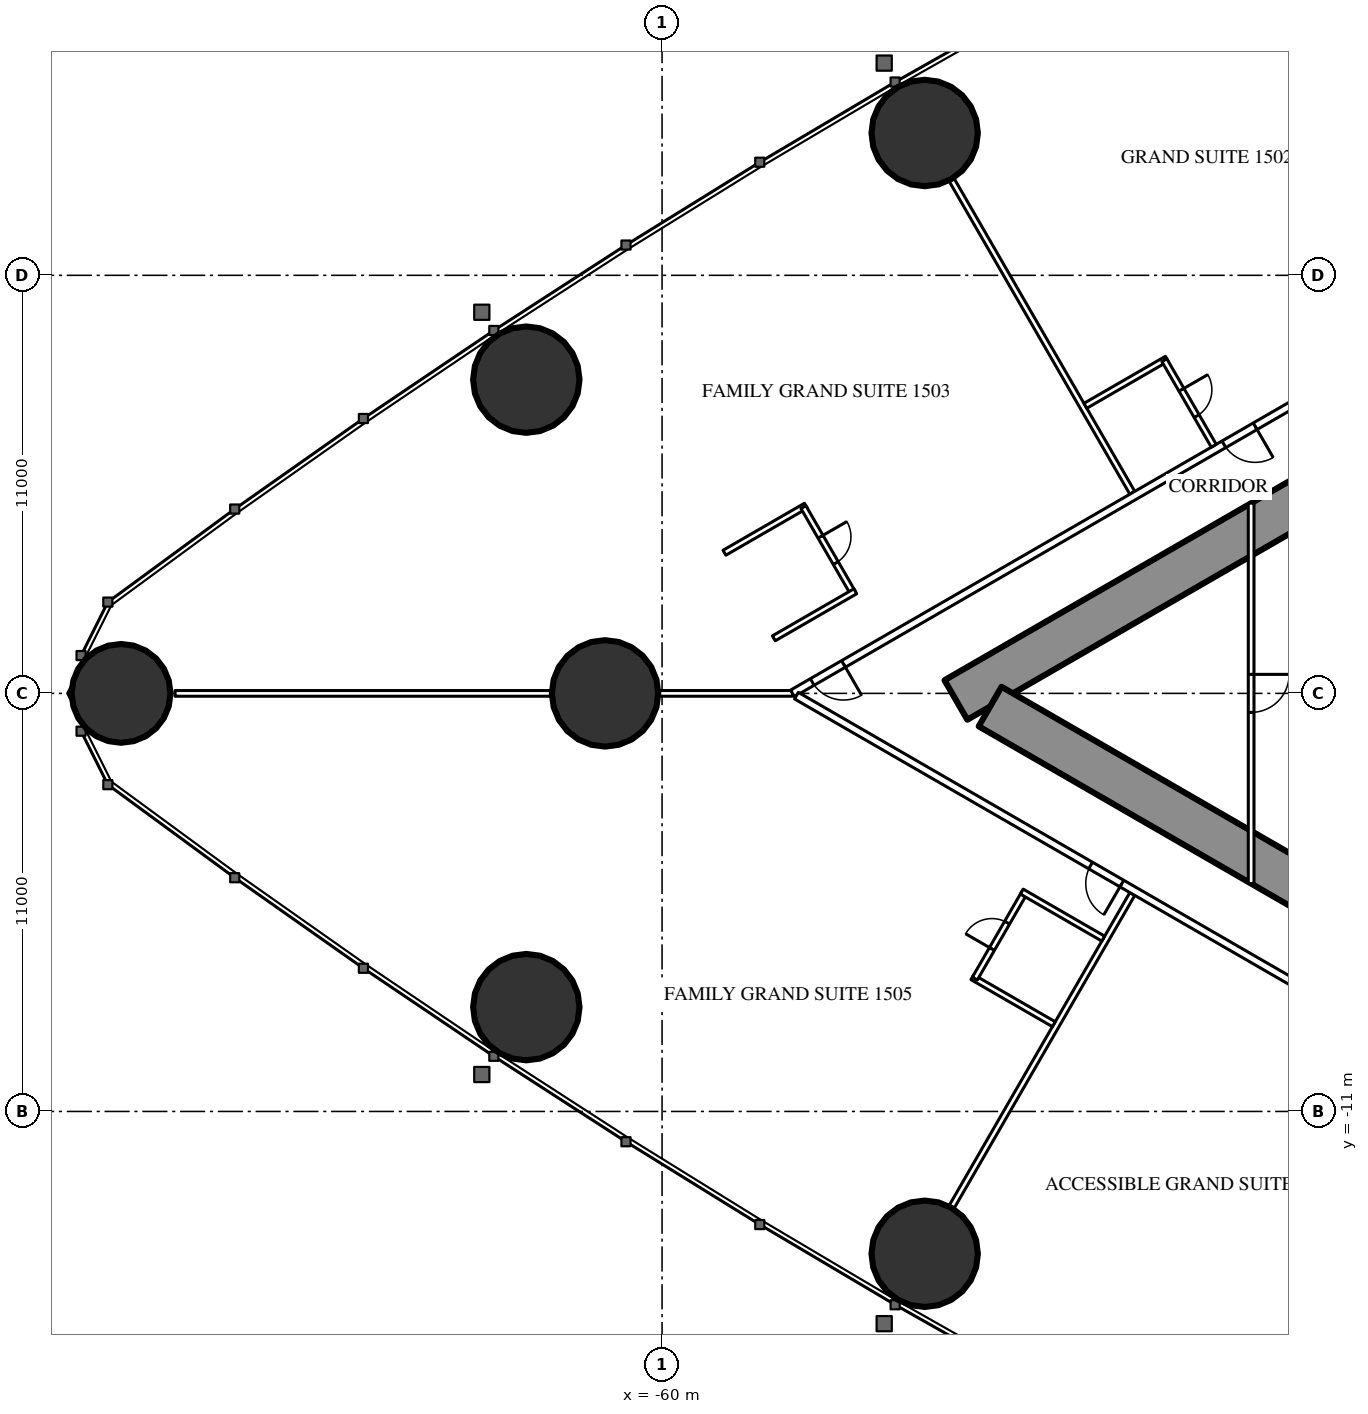
"""IFC4 building model, lengths in metres.
Left out: names, types, materials, properties, quantities, classifications, styles, units other than length and angle.
Written with IfcOpenShell. Run it as: python <this file> out.ifc"""

import sys

from ifc_helpers import new_model, si_unit, direction, frame, frame_2d, origin, origin_2d, place, context, subcontext, project, spatial, rectangle, hollow_circle, extrude, element, fill, save


model = new_model("IFC4")
c1 = context("Model", 3, precision=1e-05, world=origin(), true_north=direction((0.0, 1.0)))
c2 = subcontext(c1, "Body", "Model", "MODEL_VIEW")
j1 = project(units=[si_unit("LENGTHUNIT", "METRE"), si_unit("PLANEANGLEUNIT", "RADIAN")], contexts=[c1])
p1 = place(None, origin())
s1 = spatial("IfcSite", under=j1, at=p1, CompositionType="ELEMENT")
p2 = place(p1, origin())
s2 = spatial("IfcBuilding", under=s1, at=p2, CompositionType="ELEMENT")
p3 = place(p2, frame((0.0, 0.0, 60.0)))
s3 = spatial("IfcBuildingStorey", under=s2, at=p3, CompositionType="ELEMENT", Elevation=60.0)
p4 = place(p3, frame((-74.235, 0.0, 0.0), z_axis=(0.0, 0.0, 1.0), x_axis=(1.0, 0.0, 0.0)))
e1 = element("IfcColumn", 1, at=p4, inside=s3, PredefinedType="COLUMN", context=c2, shape_type="SweptSolid", body=[
    extrude(hollow_circle(Radius=1.3, WallThickness=0.1, at=origin_2d()), origin(), (0.0, 0.0, 1.0), 3.5),
])
for number, where, z_axis, x_axis in (
    (2, (-63.572, -8.255, 0.0), (0.0, 0.0, 1.0), (1.0, 0.0, 0.0)),
    (3, (-53.09, -14.745, 0.0), (0.0, 0.0, 1.0), (1.0, 0.0, 0.0)),
    (4, (-53.09, 14.745, 0.0), (0.0, 0.0, 1.0), (1.0, 0.0, 0.0)),
    (5, (-63.572, 8.255, 0.0), (0.0, 0.0, 1.0), (1.0, 0.0, 0.0)),
):
    element("IfcColumn", number, at=place(p3, frame(where, z_axis=z_axis, x_axis=x_axis)), inside=s3, PredefinedType="COLUMN", context=c2, shape_type="SweptSolid", body=[
        extrude(hollow_circle(Radius=1.4, WallThickness=0.12, at=origin_2d()), origin(), (0.0, 0.0, 1.0), 3.5),
    ])
p5 = place(p3, frame((-61.5, 0.0, 0.0), z_axis=(0.0, 0.0, 1.0), x_axis=(1.0, 0.0, 0.0)))
e6 = element("IfcColumn", 6, at=p5, inside=s3, PredefinedType="COLUMN", context=c2, shape_type="SweptSolid", body=[
    extrude(hollow_circle(Radius=1.4, WallThickness=0.1, at=origin_2d()), origin(), (0.0, 0.0, 1.0), 3.5),
])
p6 = place(p3, frame((-27.2, 14.3, 0.0), z_axis=(0.0, 0.0, 1.0), x_axis=(-0.866026593062, -0.499997940104, 0.0)))
e7 = element("IfcWall", 7, at=p6, inside=s3, PredefinedType="SHEAR", context=c2, shape_type="SweptSolid", body=[
    extrude(rectangle(XDim=28.946, YDim=1.2, at=frame_2d((14.473, 0.0))), origin(), (0.0, 0.0, 1.0), 3.5),
])
p7 = place(p6, frame((4.6, 0.0, 0.0)))
e8 = element("IfcOpeningElement", 8, at=p7, cuts=e7, PredefinedType="OPENING", context=c2, shape_type="SweptSolid", body=[
    extrude(rectangle(XDim=1.0, YDim=2.2, at=frame_2d((0.5, 1.1))), frame((0.0, 0.61, 0.0), z_axis=(0.0, -1.0, 0.0), x_axis=(1.0, 0.0, 0.0)), (0.0, 0.0, 1.0), 1.22),
])
p8 = place(p6, frame((13.395, 0.0, 0.0)))
e9 = element("IfcOpeningElement", 9, at=p8, cuts=e7, PredefinedType="OPENING", context=c2, shape_type="SweptSolid", body=[
    extrude(rectangle(XDim=1.8, YDim=2.2, at=frame_2d((0.9, 1.1))), frame((0.0, 0.61, 0.0), z_axis=(0.0, -1.0, 0.0), x_axis=(1.0, 0.0, 0.0)), (0.0, 0.0, 1.0), 1.22),
])
p9 = place(p3, frame((-27.2, -14.3, 0.0), z_axis=(0.0, 0.0, 1.0), x_axis=(-0.866024021859, 0.500002393557, 0.0)))
e10 = element("IfcWall", 10, at=p9, inside=s3, PredefinedType="SHEAR", context=c2, shape_type="SweptSolid", body=[
    extrude(rectangle(XDim=27.907, YDim=1.2, at=frame_2d((13.954, 0.0))), origin(), (0.0, 0.0, 1.0), 3.5),
])
p10 = place(p9, frame((4.6, 0.0, 0.0)))
e11 = element("IfcOpeningElement", 11, at=p10, cuts=e10, PredefinedType="OPENING", context=c2, shape_type="SweptSolid", body=[
    extrude(rectangle(XDim=1.0, YDim=2.2, at=frame_2d((0.5, 1.1))), frame((0.0, 0.61, 0.0), z_axis=(0.0, -1.0, 0.0), x_axis=(1.0, 0.0, 0.0)), (0.0, 0.0, 1.0), 1.22),
])
p11 = place(p9, frame((13.395, 0.0, 0.0)))
e12 = element("IfcOpeningElement", 12, at=p11, cuts=e10, PredefinedType="OPENING", context=c2, shape_type="SweptSolid", body=[
    extrude(rectangle(XDim=1.8, YDim=2.2, at=frame_2d((0.9, 1.1))), frame((0.0, 0.61, 0.0), z_axis=(0.0, -1.0, 0.0), x_axis=(1.0, 0.0, 0.0)), (0.0, 0.0, 1.0), 1.22),
])
for number, where, z_axis, x_axis in (
    (13, (-47.627, 5.278, 0.0), (0.0, 0.0, 1.0), (-0.5, 0.866, 0.0)),
    (14, (-47.627, -5.278, 0.0), (0.0, 0.0, 1.0), (-0.5, -0.866, 0.0)),
):
    element("IfcWall", number, at=place(p3, frame(where, z_axis=z_axis, x_axis=x_axis)), inside=s3, PredefinedType="PARTITIONING", context=c2, shape_type="SweptSolid", body=[
        extrude(rectangle(XDim=9.51, YDim=0.15, at=frame_2d((4.755, 0.0))), origin(), (0.0, 0.0, 1.0), 2.25),
    ])
p12 = place(p3, frame((-56.568, 0.0, 0.0), z_axis=(0.0, 0.0, 1.0), x_axis=(-1.0, 0.0, 0.0)))
e15 = element("IfcWall", 15, at=p12, inside=s3, PredefinedType="PARTITIONING", context=c2, shape_type="SweptSolid", body=[
    extrude(rectangle(XDim=16.247, YDim=0.15, at=frame_2d((8.124, 0.0))), origin(), (0.0, 0.0, 1.0), 2.25),
])
p13 = place(p3, frame((-37.7, 10.894, 0.0), z_axis=(0.0, 0.0, 1.0), x_axis=(-0.866027905338, -0.499995667157, 0.0)))
e16 = element("IfcWall", 16, at=p13, inside=s3, PredefinedType="PARTITIONING", context=c2, shape_type="SweptSolid", body=[
    extrude(rectangle(XDim=21.787, YDim=0.2, at=frame_2d((10.894, 0.0))), origin(), (0.0, 0.0, 1.0), 3.25),
])
p14 = place(p13, frame((20.237, 0.0, 0.0)))
e17 = element("IfcOpeningElement", 17, at=p14, cuts=e16, PredefinedType="OPENING", context=c2, shape_type="SweptSolid", body=[
    extrude(rectangle(XDim=0.95, YDim=2.2, at=frame_2d((0.475, 1.1))), frame((0.0, 0.11, 0.0), z_axis=(0.0, -1.0, 0.0), x_axis=(1.0, 0.0, 0.0)), (0.0, 0.0, 1.0), 0.22),
])
p15 = place(p13, frame((7.73, 0.0, 0.0)))
e18 = element("IfcOpeningElement", 18, at=p15, cuts=e16, PredefinedType="OPENING", context=c2, shape_type="SweptSolid", body=[
    extrude(rectangle(XDim=0.95, YDim=2.2, at=frame_2d((0.475, 1.1))), frame((0.0, 0.11, 0.0), z_axis=(0.0, -1.0, 0.0), x_axis=(1.0, 0.0, 0.0)), (0.0, 0.0, 1.0), 0.22),
])
p16 = place(p3, frame((-36.92, -11.344, 0.0), z_axis=(0.0, 0.0, 1.0), x_axis=(-0.866028313256, 0.499994960614, 0.0)))
e19 = element("IfcWall", 19, at=p16, inside=s3, PredefinedType="PARTITIONING", context=c2, shape_type="SweptSolid", body=[
    extrude(rectangle(XDim=22.568, YDim=0.2, at=frame_2d((11.284, 0.0))), origin(), (0.0, 0.0, 1.0), 3.25),
])
p17 = place(p16, frame((12.68, 0.0, 0.0)))
e20 = element("IfcOpeningElement", 20, at=p17, cuts=e19, PredefinedType="OPENING", context=c2, shape_type="SweptSolid", body=[
    extrude(rectangle(XDim=0.95, YDim=2.2, at=frame_2d((0.475, 1.1))), frame((0.0, 0.11, 0.0), z_axis=(0.0, -1.0, 0.0), x_axis=(1.0, 0.0, 0.0)), (0.0, 0.0, 1.0), 0.22),
])
p18 = place(p16, frame((3.35, 0.0, 0.0)))
e21 = element("IfcOpeningElement", 21, at=p18, cuts=e19, PredefinedType="OPENING", context=c2, shape_type="SweptSolid", body=[
    extrude(rectangle(XDim=1.0, YDim=2.2, at=frame_2d((0.5, 1.1))), frame((0.0, 0.11, 0.0), z_axis=(0.0, -1.0, 0.0), x_axis=(1.0, 0.0, 0.0)), (0.0, 0.0, 1.0), 0.22),
])
p19 = place(p3, frame((-56.215, 4.938, 0.0), z_axis=(0.0, 0.0, 1.0), x_axis=(-0.866006523861, -0.500032699561, 0.0)))
e22 = element("IfcWall", 22, at=p19, inside=s3, PredefinedType="PARTITIONING", context=c2, shape_type="SweptSolid", body=[
    extrude(rectangle(XDim=2.475, YDim=0.15, at=frame_2d((1.237, 0.0))), origin(), (0.0, 0.0, 1.0), 3.25),
])
p20 = place(p3, frame((-54.98, 2.649, 0.0), z_axis=(0.0, 0.0, 1.0), x_axis=(-0.500006934395, 0.866021400173, 0.0)))
e23 = element("IfcWall", 23, at=p20, inside=s3, PredefinedType="PARTITIONING", context=c2, shape_type="SweptSolid", body=[
    extrude(rectangle(XDim=2.6, YDim=0.15, at=frame_2d((1.3, 0.0))), origin(), (0.0, 0.0, 1.0), 3.25),
])
p21 = place(p20, frame((0.9, 0.0, 0.0)))
e24 = element("IfcOpeningElement", 24, at=p21, cuts=e23, PredefinedType="OPENING", context=c2, shape_type="SweptSolid", body=[
    extrude(rectangle(XDim=0.8, YDim=2.2, at=frame_2d((0.4, 1.1))), frame((0.0, 0.085, 0.0), z_axis=(0.0, -1.0, 0.0), x_axis=(1.0, 0.0, 0.0)), (0.0, 0.0, 1.0), 0.17),
])
p22 = place(p3, frame((-54.915, 2.687, 0.0), z_axis=(0.0, 0.0, 1.0), x_axis=(-0.866006523861, -0.500032699561, 0.0)))
e25 = element("IfcWall", 25, at=p22, inside=s3, PredefinedType="PARTITIONING", context=c2, shape_type="SweptSolid", body=[
    extrude(rectangle(XDim=2.475, YDim=0.15, at=frame_2d((1.237, 0.0))), origin(), (0.0, 0.0, 1.0), 3.25),
])
p23 = place(p3, frame((-49.692, -8.704, 0.0), z_axis=(0.0, 0.0, 1.0), x_axis=(-0.866073894602, 0.499916002032, 0.0)))
e26 = element("IfcWall", 26, at=p23, inside=s3, PredefinedType="PARTITIONING", context=c2, shape_type="SweptSolid", body=[
    extrude(rectangle(XDim=2.475, YDim=0.15, at=frame_2d((1.238, 0.0))), origin(), (0.0, 0.0, 1.0), 3.25),
])
p24 = place(p3, frame((-50.47, -5.253, 0.0), z_axis=(0.0, 0.0, 1.0), x_axis=(-0.500006934395, -0.866021400173, 0.0)))
e27 = element("IfcWall", 27, at=p24, inside=s3, PredefinedType="PARTITIONING", context=c2, shape_type="SweptSolid", body=[
    extrude(rectangle(XDim=2.6, YDim=0.15, at=frame_2d((1.3, 0.0))), origin(), (0.0, 0.0, 1.0), 3.25),
])
p25 = place(p24, frame((0.9, 0.0, 0.0)))
e28 = element("IfcOpeningElement", 28, at=p25, cuts=e27, PredefinedType="OPENING", context=c2, shape_type="SweptSolid", body=[
    extrude(rectangle(XDim=0.8, YDim=2.2, at=frame_2d((0.4, 1.1))), frame((0.0, 0.085, 0.0), z_axis=(0.0, -1.0, 0.0), x_axis=(1.0, 0.0, 0.0)), (0.0, 0.0, 1.0), 0.17),
])
for number, where, z_axis, x_axis in (
    (29, (-48.392, -6.453, 0.0), (0.0, 0.0, 1.0), (-0.866, 0.5, 0.0)),
    (30, (-46.719, 8.804, 0.0), (0.0, 0.0, 1.0), (-0.866, -0.5, 0.0)),
):
    element("IfcWall", number, at=place(p3, frame(where, z_axis=z_axis, x_axis=x_axis)), inside=s3, PredefinedType="PARTITIONING", context=c2, shape_type="SweptSolid", body=[
        extrude(rectangle(XDim=2.475, YDim=0.15, at=frame_2d((1.237, 0.0))), origin(), (0.0, 0.0, 1.0), 3.25),
    ])
p26 = place(p3, frame((-45.483, 6.515, 0.0), z_axis=(0.0, 0.0, 1.0), x_axis=(-0.500006934395, 0.866021400173, 0.0)))
e31 = element("IfcWall", 31, at=p26, inside=s3, PredefinedType="PARTITIONING", context=c2, shape_type="SweptSolid", body=[
    extrude(rectangle(XDim=2.6, YDim=0.15, at=frame_2d((1.3, 0.0))), origin(), (0.0, 0.0, 1.0), 3.25),
])
p27 = place(p26, frame((0.9, 0.0, 0.0)))
e32 = element("IfcOpeningElement", 32, at=p27, cuts=e31, PredefinedType="OPENING", context=c2, shape_type="SweptSolid", body=[
    extrude(rectangle(XDim=0.8, YDim=2.2, at=frame_2d((0.4, 1.1))), frame((0.0, 0.085, 0.0), z_axis=(0.0, -1.0, 0.0), x_axis=(1.0, 0.0, 0.0)), (0.0, 0.0, 1.0), 0.17),
])
p28 = place(p3, frame((-44.5, 5.005, 0.0), z_axis=(0.0, 0.0, 1.0), x_axis=(0.0, -1.0, 0.0)))
e33 = element("IfcWall", 33, at=p28, inside=s3, PredefinedType="PARTITIONING", context=c2, shape_type="SweptSolid", body=[
    extrude(rectangle(XDim=10.009, YDim=0.15, at=frame_2d((5.005, 0.0))), origin(), (0.0, 0.0, 1.0), 2.45),
])
p29 = place(p28, frame((4.505, 0.0, 0.0)))
e34 = element("IfcOpeningElement", 34, at=p29, cuts=e33, PredefinedType="OPENING", context=c2, shape_type="SweptSolid", body=[
    extrude(rectangle(XDim=1.0, YDim=2.2, at=frame_2d((0.5, 1.1))), frame((0.0, 0.085, 0.0), z_axis=(0.0, -1.0, 0.0), x_axis=(1.0, 0.0, 0.0)), (0.0, 0.0, 1.0), 0.17),
])
p30 = place(p21, origin())
e35 = element("IfcDoor", 35, at=p30, inside=s3, OperationType="SINGLE_SWING_RIGHT", PredefinedType="DOOR", context=c2, shape_type="SweptSolid", body=[
    extrude(rectangle(XDim=0.8, YDim=2.2, at=frame_2d((0.4, 1.1))), frame((0.0, 0.025, 0.0), z_axis=(0.0, -1.0, 0.0), x_axis=(1.0, 0.0, 0.0)), (0.0, 0.0, 1.0), 0.05),
])
fill(e24, e35)
p31 = place(p14, origin())
e36 = element("IfcDoor", 36, at=p31, inside=s3, OperationType="SINGLE_SWING_LEFT", PredefinedType="DOOR", context=c2, shape_type="SweptSolid", body=[
    extrude(rectangle(XDim=0.95, YDim=2.2, at=frame_2d((0.475, 1.1))), frame((0.0, 0.025, 0.0), z_axis=(0.0, -1.0, 0.0), x_axis=(1.0, 0.0, 0.0)), (0.0, 0.0, 1.0), 0.05),
])
fill(e17, e36)
p32 = place(p25, origin())
e37 = element("IfcDoor", 37, at=p32, inside=s3, OperationType="SINGLE_SWING_RIGHT", PredefinedType="DOOR", context=c2, shape_type="SweptSolid", body=[
    extrude(rectangle(XDim=0.8, YDim=2.2, at=frame_2d((0.4, 1.1))), frame((0.0, 0.025, 0.0), z_axis=(0.0, -1.0, 0.0), x_axis=(1.0, 0.0, 0.0)), (0.0, 0.0, 1.0), 0.05),
])
fill(e28, e37)
p33 = place(p17, origin())
e38 = element("IfcDoor", 38, at=p33, inside=s3, OperationType="SINGLE_SWING_LEFT", PredefinedType="DOOR", context=c2, shape_type="SweptSolid", body=[
    extrude(rectangle(XDim=0.95, YDim=2.2, at=frame_2d((0.475, 1.1))), frame((0.0, 0.025, 0.0), z_axis=(0.0, -1.0, 0.0), x_axis=(1.0, 0.0, 0.0)), (0.0, 0.0, 1.0), 0.05),
])
fill(e20, e38)
p34 = place(p27, origin())
e39 = element("IfcDoor", 39, at=p34, inside=s3, OperationType="SINGLE_SWING_RIGHT", PredefinedType="DOOR", context=c2, shape_type="SweptSolid", body=[
    extrude(rectangle(XDim=0.8, YDim=2.2, at=frame_2d((0.4, 1.1))), frame((0.0, 0.025, 0.0), z_axis=(0.0, -1.0, 0.0), x_axis=(1.0, 0.0, 0.0)), (0.0, 0.0, 1.0), 0.05),
])
fill(e32, e39)
p35 = place(p15, origin())
e40 = element("IfcDoor", 40, at=p35, inside=s3, OperationType="SINGLE_SWING_LEFT", PredefinedType="DOOR", context=c2, shape_type="SweptSolid", body=[
    extrude(rectangle(XDim=0.95, YDim=2.2, at=frame_2d((0.475, 1.1))), frame((0.0, 0.025, 0.0), z_axis=(0.0, -1.0, 0.0), x_axis=(1.0, 0.0, 0.0)), (0.0, 0.0, 1.0), 0.05),
])
fill(e18, e40)
p36 = place(p29, origin())
e41 = element("IfcDoor", 41, at=p36, inside=s3, OperationType="SINGLE_SWING_LEFT", PredefinedType="DOOR", context=c2, shape_type="SweptSolid", body=[
    extrude(rectangle(XDim=1.0, YDim=2.2, at=frame_2d((0.5, 1.1))), frame((0.0, 0.025, 0.0), z_axis=(0.0, -1.0, 0.0), x_axis=(1.0, 0.0, 0.0)), (0.0, 0.0, 1.0), 0.05),
])
fill(e34, e41)
save(model, sys.argv[1])
